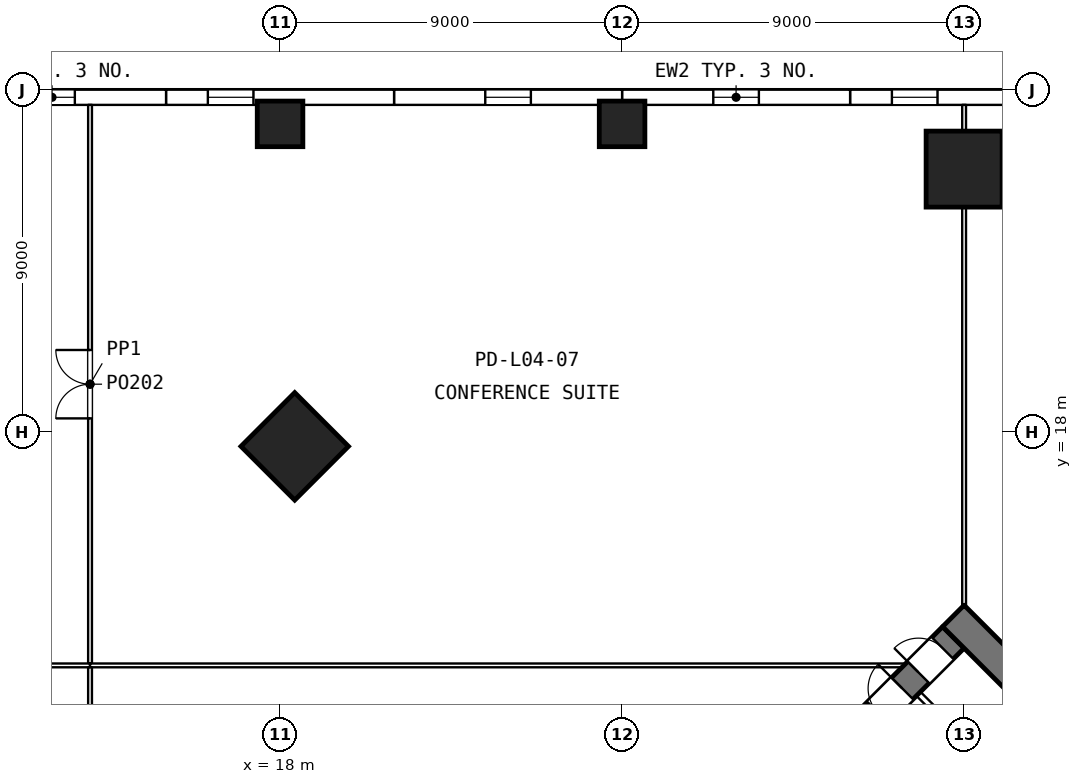
"""IFC4 building model, lengths in metres.
Left out: names, types, materials, properties, quantities, classifications, styles, units other than length and angle.
Written with IfcOpenShell. Run it as: python <this file> out.ifc"""

import sys

from ifc_helpers import new_model, si_unit, direction, frame, frame_2d, origin, origin_2d, place, context, subcontext, project, spatial, rectangle, extrude, element, fill, save


model = new_model("IFC4")
c1 = context("Model", 3, precision=1e-05, world=origin(), true_north=direction((0.0, 1.0)))
c2 = subcontext(c1, "Body", "Model", "MODEL_VIEW")
j1 = project(units=[si_unit("LENGTHUNIT", "METRE"), si_unit("PLANEANGLEUNIT", "RADIAN")], contexts=[c1])
p1 = place(None, origin())
s1 = spatial("IfcSite", under=j1, at=p1, CompositionType="ELEMENT")
p2 = place(p1, origin())
s2 = spatial("IfcBuilding", under=s1, at=p2, CompositionType="ELEMENT")
p3 = place(p2, frame((0.0, 0.0, 22.8)))
s3 = spatial("IfcBuildingStorey", under=s2, at=p3, CompositionType="ELEMENT", Elevation=22.8)
for number, where, z_axis, x_axis in (
    (1, (18.0, 26.1, 0.0), (0.0, 0.0, 1.0), (1.0, 0.0, 0.0)),
    (2, (27.0, 26.1, 0.0), (0.0, 0.0, 1.0), (1.0, 0.0, 0.0)),
):
    element("IfcColumn", number, at=place(p3, frame(where, z_axis=z_axis, x_axis=x_axis)), inside=s3, PredefinedType="COLUMN", context=c2, shape_type="SweptSolid", body=[
        extrude(rectangle(XDim=1.2, YDim=1.2, at=origin_2d()), origin(), (0.0, 0.0, 1.0), 4.8),
    ])
for number, where, z_axis, x_axis in (
    (3, (36.0, 24.91, 0.0), (0.0, 0.0, 1.0), (0.0, 1.0, 0.0)),
    (4, (18.386, 17.614, 0.0), (0.0, 0.0, 1.0), (-0.707, 0.707, 0.0)),
):
    element("IfcColumn", number, at=place(p3, frame(where, z_axis=z_axis, x_axis=x_axis)), inside=s3, PredefinedType="COLUMN", context=c2, shape_type="SweptSolid", body=[
        extrude(rectangle(XDim=2.0, YDim=2.0, at=origin_2d()), origin(), (0.0, 0.0, 1.0), 4.8),
    ])
p4 = place(p3, frame((39.0, 26.8, 0.0), z_axis=(0.0, 0.0, 1.0), x_axis=(-1.0, 0.0, 0.0)))
e5 = element("IfcWall", 5, at=p4, inside=s3, PredefinedType="SOLIDWALL", context=c2, shape_type="SweptSolid", body=[
    extrude(rectangle(XDim=6.0, YDim=0.4, at=frame_2d((3.0, 0.0))), origin(), (0.0, 0.0, 1.0), 4.5),
])
p5 = place(p4, frame((3.7, 0.0, 1.1)))
e6 = element("IfcOpeningElement", 6, at=p5, cuts=e5, PredefinedType="OPENING", context=c2, shape_type="SweptSolid", body=[
    extrude(rectangle(XDim=1.2, YDim=1.8, at=frame_2d((0.6, 0.9))), frame((0.0, 0.21, 0.0), z_axis=(0.0, -1.0, 0.0), x_axis=(1.0, 0.0, 0.0)), (0.0, 0.0, 1.0), 0.42),
])
p6 = place(p3, frame((33.0, 26.8, 0.0), z_axis=(0.0, 0.0, 1.0), x_axis=(-1.0, 0.0, 0.0)))
e7 = element("IfcWall", 7, at=p6, inside=s3, PredefinedType="SOLIDWALL", context=c2, shape_type="SweptSolid", body=[
    extrude(rectangle(XDim=6.0, YDim=0.4, at=frame_2d((3.0, 0.0))), origin(), (0.0, 0.0, 1.0), 4.5),
])
p7 = place(p6, frame((2.4, 0.0, 1.1)))
e8 = element("IfcOpeningElement", 8, at=p7, cuts=e7, PredefinedType="OPENING", context=c2, shape_type="SweptSolid", body=[
    extrude(rectangle(XDim=1.2, YDim=1.8, at=frame_2d((0.6, 0.9))), frame((0.0, 0.21, 0.0), z_axis=(0.0, -1.0, 0.0), x_axis=(1.0, 0.0, 0.0)), (0.0, 0.0, 1.0), 0.42),
])
p8 = place(p3, frame((27.0, 26.8, 0.0), z_axis=(0.0, 0.0, 1.0), x_axis=(-1.0, 0.0, 0.0)))
e9 = element("IfcWall", 9, at=p8, inside=s3, PredefinedType="SOLIDWALL", context=c2, shape_type="SweptSolid", body=[
    extrude(rectangle(XDim=6.0, YDim=0.4, at=frame_2d((3.0, 0.0))), origin(), (0.0, 0.0, 1.0), 4.5),
])
p9 = place(p8, frame((2.4, 0.0, 1.1)))
e10 = element("IfcOpeningElement", 10, at=p9, cuts=e9, PredefinedType="OPENING", context=c2, shape_type="SweptSolid", body=[
    extrude(rectangle(XDim=1.2, YDim=1.8, at=frame_2d((0.6, 0.9))), frame((0.0, 0.21, 0.0), z_axis=(0.0, -1.0, 0.0), x_axis=(1.0, 0.0, 0.0)), (0.0, 0.0, 1.0), 0.42),
])
p10 = place(p3, frame((21.0, 26.8, 0.0), z_axis=(0.0, 0.0, 1.0), x_axis=(-1.0, 0.0, 0.0)))
e11 = element("IfcWall", 11, at=p10, inside=s3, PredefinedType="SOLIDWALL", context=c2, shape_type="SweptSolid", body=[
    extrude(rectangle(XDim=6.0, YDim=0.4, at=frame_2d((3.0, 0.0))), origin(), (0.0, 0.0, 1.0), 4.5),
])
p11 = place(p10, frame((3.7, 0.0, 1.1)))
e12 = element("IfcOpeningElement", 12, at=p11, cuts=e11, PredefinedType="OPENING", context=c2, shape_type="SweptSolid", body=[
    extrude(rectangle(XDim=1.2, YDim=1.8, at=frame_2d((0.6, 0.9))), frame((0.0, 0.21, 0.0), z_axis=(0.0, -1.0, 0.0), x_axis=(1.0, 0.0, 0.0)), (0.0, 0.0, 1.0), 0.42),
])
p12 = place(p3, frame((15.0, 26.8, 0.0), z_axis=(0.0, 0.0, 1.0), x_axis=(-1.0, 0.0, 0.0)))
e13 = element("IfcWall", 13, at=p12, inside=s3, PredefinedType="SOLIDWALL", context=c2, shape_type="SweptSolid", body=[
    extrude(rectangle(XDim=6.0, YDim=0.4, at=frame_2d((3.0, 0.0))), origin(), (0.0, 0.0, 1.0), 4.5),
])
p13 = place(p12, frame((2.4, 0.0, 1.1)))
e14 = element("IfcOpeningElement", 14, at=p13, cuts=e13, PredefinedType="OPENING", context=c2, shape_type="SweptSolid", body=[
    extrude(rectangle(XDim=1.2, YDim=1.8, at=frame_2d((0.6, 0.9))), frame((0.0, 0.21, 0.0), z_axis=(0.0, -1.0, 0.0), x_axis=(1.0, 0.0, 0.0)), (0.0, 0.0, 1.0), 0.42),
])
p14 = place(p3, frame((23.414, 0.283, 0.0), z_axis=(0.0, 0.0, 1.0), x_axis=(0.707106781187, 0.707106781187, 0.0)))
e15 = element("IfcWall", 15, at=p14, inside=s3, PredefinedType="SHEAR", context=c2, shape_type="SweptSolid", body=[
    extrude(rectangle(XDim=17.4, YDim=0.8, at=frame_2d((8.7, 0.0))), origin(), (0.0, 0.0, 1.0), 4.5),
])
p15 = place(p14, frame((8.9, 0.0, 0.0)))
e16 = element("IfcOpeningElement", 16, at=p15, cuts=e15, PredefinedType="OPENING", context=c2, shape_type="SweptSolid", body=[
    extrude(rectangle(XDim=1.2, YDim=2.1, at=frame_2d((0.6, 1.05))), frame((0.0, 0.41, 0.0), z_axis=(0.0, -1.0, 0.0), x_axis=(1.0, 0.0, 0.0)), (0.0, 0.0, 1.0), 0.82),
])
p16 = place(p14, frame((14.6, 0.0, 0.0)))
e17 = element("IfcOpeningElement", 17, at=p16, cuts=e15, PredefinedType="OPENING", context=c2, shape_type="SweptSolid", body=[
    extrude(rectangle(XDim=0.9, YDim=2.1, at=frame_2d((0.45, 1.05))), frame((0.0, 0.41, 0.0), z_axis=(0.0, -1.0, 0.0), x_axis=(1.0, 0.0, 0.0)), (0.0, 0.0, 1.0), 0.82),
])
p17 = place(p14, frame((16.1, 0.0, 0.0)))
e18 = element("IfcOpeningElement", 18, at=p17, cuts=e15, PredefinedType="OPENING", context=c2, shape_type="SweptSolid", body=[
    extrude(rectangle(XDim=0.9, YDim=2.1, at=frame_2d((0.45, 1.05))), frame((0.0, 0.41, 0.0), z_axis=(0.0, -1.0, 0.0), x_axis=(1.0, 0.0, 0.0)), (0.0, 0.0, 1.0), 0.82),
])
p18 = place(p3, frame((37.503, 8.397, 0.0), z_axis=(0.0, 0.0, 1.0), x_axis=(-0.707138693938, 0.707074866995, 0.0)))
e19 = element("IfcWall", 19, at=p18, inside=s3, PredefinedType="PARTITIONING", context=c2, shape_type="SweptSolid", body=[
    extrude(rectangle(XDim=3.825, YDim=0.15, at=frame_2d((1.913, 0.0))), origin(), (0.0, 0.0, 1.0), 4.5),
])
p19 = place(p3, frame((49.152, -0.283, 0.0), z_axis=(0.0, 0.0, 1.0), x_axis=(-0.707106781187, 0.707106781187, 0.0)))
e20 = element("IfcWall", 20, at=p19, inside=s3, PredefinedType="SHEAR", context=c2, shape_type="SweptSolid", body=[
    extrude(rectangle(XDim=19.0, YDim=0.8, at=frame_2d((9.5, 0.0))), origin(), (0.0, 0.0, 1.0), 4.5),
])
p20 = place(p19, frame((8.3, 0.0, 0.0)))
e21 = element("IfcOpeningElement", 21, at=p20, cuts=e20, PredefinedType="OPENING", context=c2, shape_type="SweptSolid", body=[
    extrude(rectangle(XDim=2.4, YDim=2.1, at=frame_2d((1.2, 1.05))), frame((0.0, 0.41, 0.0), z_axis=(0.0, -1.0, 0.0), x_axis=(1.0, 0.0, 0.0)), (0.0, 0.0, 1.0), 0.82),
])
p21 = place(p3, frame((13.0, 11.9, 0.0), z_axis=(0.0, 0.0, 1.0), x_axis=(0.0, 1.0, 0.0)))
e22 = element("IfcWall", 22, at=p21, inside=s3, PredefinedType="PARTITIONING", context=c2, shape_type="SweptSolid", body=[
    extrude(rectangle(XDim=14.7, YDim=0.1, at=frame_2d((7.35, 0.0))), origin(), (0.0, 0.0, 1.0), 4.5),
])
p22 = place(p21, frame((6.45, 0.0, 0.0)))
e23 = element("IfcOpeningElement", 23, at=p22, cuts=e22, PredefinedType="OPENING", context=c2, shape_type="SweptSolid", body=[
    extrude(rectangle(XDim=1.8, YDim=2.1, at=frame_2d((0.9, 1.05))), frame((0.0, 0.06, 0.0), z_axis=(0.0, -1.0, 0.0), x_axis=(1.0, 0.0, 0.0)), (0.0, 0.0, 1.0), 0.12),
])
p23 = place(p3, frame((-13.0, 11.85, 0.0), z_axis=(0.0, 0.0, 1.0), x_axis=(1.0, 0.0, 0.0)))
e24 = element("IfcWall", 24, at=p23, inside=s3, PredefinedType="PARTITIONING", context=c2, shape_type="SweptSolid", body=[
    extrude(rectangle(XDim=26.0, YDim=0.1, at=frame_2d((13.0, 0.0))), origin(), (0.0, 0.0, 1.0), 4.5),
])
p24 = place(p23, frame((12.1, 0.0, 0.0)))
e25 = element("IfcOpeningElement", 25, at=p24, cuts=e24, PredefinedType="OPENING", context=c2, shape_type="SweptSolid", body=[
    extrude(rectangle(XDim=1.8, YDim=2.1, at=frame_2d((0.9, 1.05))), frame((0.0, 0.06, 0.0), z_axis=(0.0, -1.0, 0.0), x_axis=(1.0, 0.0, 0.0)), (0.0, 0.0, 1.0), 0.12),
])
p25 = place(p3, frame((36.0, 13.435, 0.0), z_axis=(0.0, 0.0, 1.0), x_axis=(0.0, 1.0, 0.0)))
e26 = element("IfcWall", 26, at=p25, inside=s3, PredefinedType="PARTITIONING", context=c2, shape_type="SweptSolid", body=[
    extrude(rectangle(XDim=13.165, YDim=0.1, at=frame_2d((6.583, 0.0))), origin(), (0.0, 0.0, 1.0), 3.9),
])
p26 = place(p3, frame((13.0, 11.85, 0.0), z_axis=(0.0, 0.0, 1.0), x_axis=(1.0, 0.0, 0.0)))
e27 = element("IfcWall", 27, at=p26, inside=s3, PredefinedType="PARTITIONING", context=c2, shape_type="SweptSolid", body=[
    extrude(rectangle(XDim=21.415, YDim=0.1, at=frame_2d((10.708, 0.0))), origin(), (0.0, 0.0, 1.0), 4.5),
])
p27 = place(p3, frame((13.0, -11.8, 0.0), z_axis=(0.0, 0.0, 1.0), x_axis=(0.0, 1.0, 0.0)))
e28 = element("IfcWall", 28, at=p27, inside=s3, PredefinedType="PARTITIONING", context=c2, shape_type="SweptSolid", body=[
    extrude(rectangle(XDim=23.6, YDim=0.1, at=frame_2d((11.8, 0.0))), origin(), (0.0, 0.0, 1.0), 4.5),
])
p28 = place(p27, frame((13.55, 0.0, 0.0)))
e29 = element("IfcOpeningElement", 29, at=p28, cuts=e28, PredefinedType="OPENING", context=c2, shape_type="SweptSolid", body=[
    extrude(rectangle(XDim=1.8, YDim=2.1, at=frame_2d((0.9, 1.05))), frame((0.0, 0.06, 0.0), z_axis=(0.0, -1.0, 0.0), x_axis=(1.0, 0.0, 0.0)), (0.0, 0.0, 1.0), 0.12),
])
p29 = place(p5, origin())
e30 = element("IfcWindow", 30, at=p29, inside=s3, PartitioningType="SINGLE_PANEL", PredefinedType="WINDOW", context=c2, shape_type="SweptSolid", body=[
    extrude(rectangle(XDim=1.2, YDim=1.8, at=frame_2d((0.6, 0.9))), frame((0.0, 0.03, 0.0), z_axis=(0.0, -1.0, 0.0), x_axis=(1.0, 0.0, 0.0)), (0.0, 0.0, 1.0), 0.06),
])
fill(e6, e30)
p30 = place(p7, origin())
e31 = element("IfcWindow", 31, at=p30, inside=s3, PartitioningType="SINGLE_PANEL", PredefinedType="WINDOW", context=c2, shape_type="SweptSolid", body=[
    extrude(rectangle(XDim=1.2, YDim=1.8, at=frame_2d((0.6, 0.9))), frame((0.0, 0.03, 0.0), z_axis=(0.0, -1.0, 0.0), x_axis=(1.0, 0.0, 0.0)), (0.0, 0.0, 1.0), 0.06),
])
fill(e8, e31)
p31 = place(p9, origin())
e32 = element("IfcWindow", 32, at=p31, inside=s3, PartitioningType="SINGLE_PANEL", PredefinedType="WINDOW", context=c2, shape_type="SweptSolid", body=[
    extrude(rectangle(XDim=1.2, YDim=1.8, at=frame_2d((0.6, 0.9))), frame((0.0, 0.03, 0.0), z_axis=(0.0, -1.0, 0.0), x_axis=(1.0, 0.0, 0.0)), (0.0, 0.0, 1.0), 0.06),
])
fill(e10, e32)
p32 = place(p11, origin())
e33 = element("IfcWindow", 33, at=p32, inside=s3, PartitioningType="SINGLE_PANEL", PredefinedType="WINDOW", context=c2, shape_type="SweptSolid", body=[
    extrude(rectangle(XDim=1.2, YDim=1.8, at=frame_2d((0.6, 0.9))), frame((0.0, 0.03, 0.0), z_axis=(0.0, -1.0, 0.0), x_axis=(1.0, 0.0, 0.0)), (0.0, 0.0, 1.0), 0.06),
])
fill(e12, e33)
p33 = place(p13, origin())
e34 = element("IfcWindow", 34, at=p33, inside=s3, PartitioningType="SINGLE_PANEL", PredefinedType="WINDOW", context=c2, shape_type="SweptSolid", body=[
    extrude(rectangle(XDim=1.2, YDim=1.8, at=frame_2d((0.6, 0.9))), frame((0.0, 0.03, 0.0), z_axis=(0.0, -1.0, 0.0), x_axis=(1.0, 0.0, 0.0)), (0.0, 0.0, 1.0), 0.06),
])
fill(e14, e34)
p34 = place(p16, origin())
e35 = element("IfcDoor", 35, at=p34, inside=s3, OperationType="SINGLE_SWING_RIGHT", PredefinedType="DOOR", context=c2, shape_type="SweptSolid", body=[
    extrude(rectangle(XDim=0.9, YDim=2.1, at=frame_2d((0.45, 1.05))), frame((0.0, -0.225, 0.0), z_axis=(0.0, -1.0, 0.0), x_axis=(1.0, 0.0, 0.0)), (0.0, 0.0, 1.0), 0.05),
])
fill(e17, e35)
p35 = place(p17, origin())
e36 = element("IfcDoor", 36, at=p35, inside=s3, OperationType="SINGLE_SWING_LEFT", PredefinedType="DOOR", context=c2, shape_type="SweptSolid", body=[
    extrude(rectangle(XDim=0.9, YDim=2.1, at=frame_2d((0.45, 1.05))), frame((0.0, -0.225, 0.0), z_axis=(0.0, -1.0, 0.0), x_axis=(1.0, 0.0, 0.0)), (0.0, 0.0, 1.0), 0.05),
])
fill(e18, e36)
p36 = place(p22, origin())
e37 = element("IfcDoor", 37, at=p36, inside=s3, OperationType="DOUBLE_DOOR_DOUBLE_SWING", PredefinedType="DOOR", context=c2, shape_type="SweptSolid", body=[
    extrude(rectangle(XDim=1.8, YDim=2.1, at=frame_2d((0.9, 1.05))), frame((0.0, 0.025, 0.0), z_axis=(0.0, -1.0, 0.0), x_axis=(1.0, 0.0, 0.0)), (0.0, 0.0, 1.0), 0.05),
])
fill(e23, e37)
save(model, sys.argv[1])
